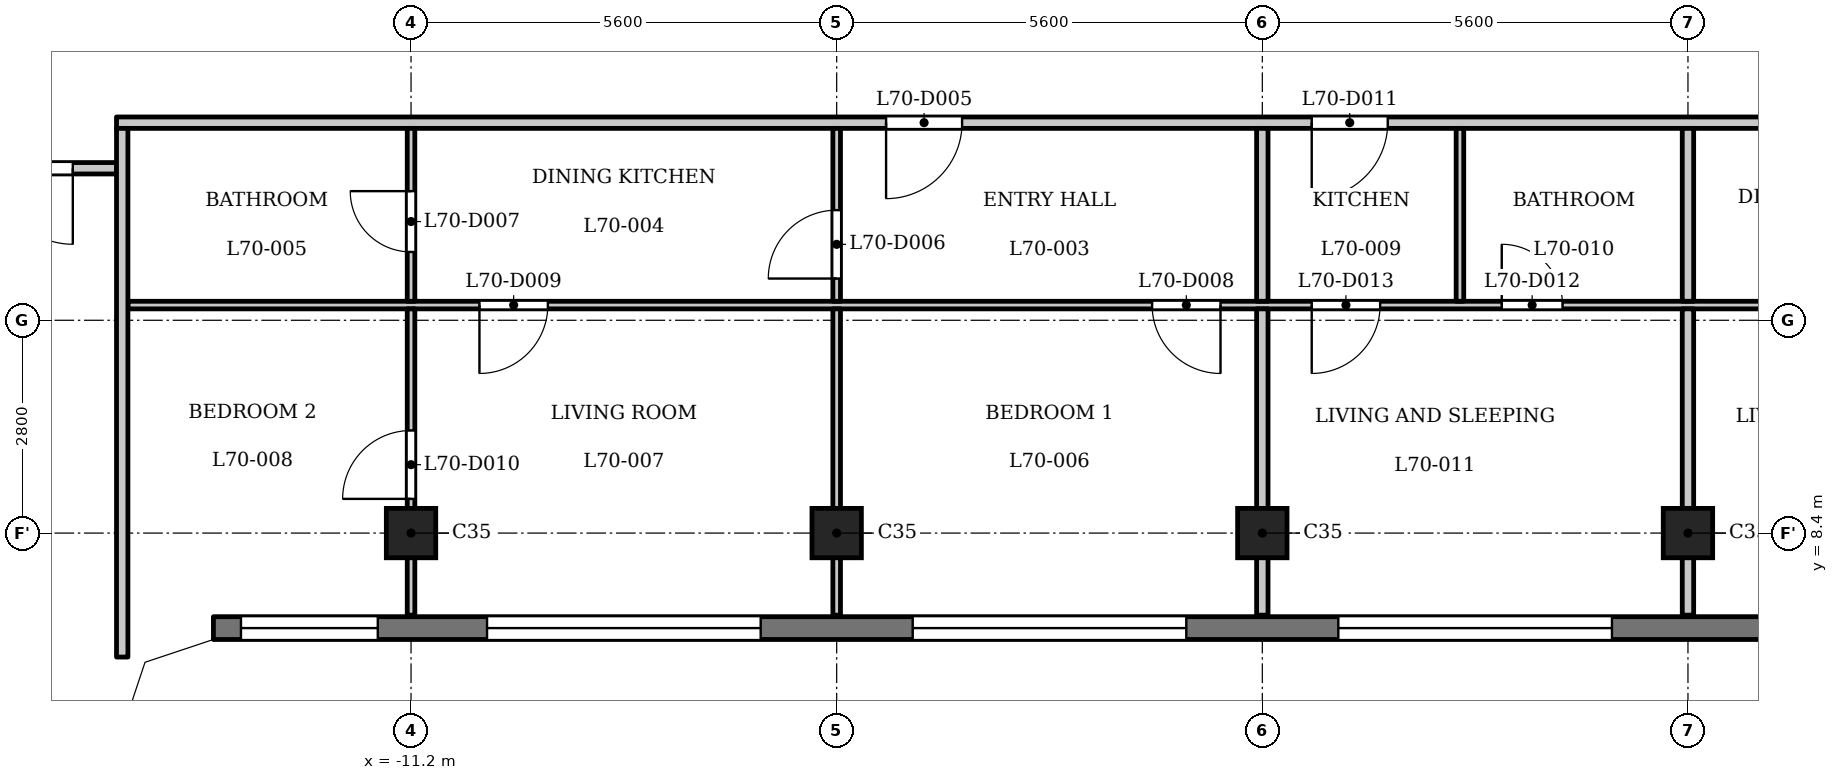
"""IFC4 building model, lengths in metres.
Left out: names, types, materials, properties, quantities, classifications, styles, units other than length and angle.
Written with IfcOpenShell. Run it as: python <this file> out.ifc"""

import sys

from ifc_helpers import new_model, si_unit, direction, frame, frame_2d, origin, origin_2d, place, context, subcontext, project, spatial, polyline, rectangle, outline, extrude, element, fill, save


model = new_model("IFC4")
c1 = context("Model", 3, precision=1e-05, world=origin(), true_north=direction((0.0, 1.0)))
c2 = subcontext(c1, "Body", "Model", "MODEL_VIEW")
j1 = project(units=[si_unit("LENGTHUNIT", "METRE"), si_unit("PLANEANGLEUNIT", "RADIAN")], contexts=[c1])
p1 = place(None, origin())
s1 = spatial("IfcSite", under=j1, at=p1, CompositionType="ELEMENT")
p2 = place(p1, origin())
s2 = spatial("IfcBuilding", under=s1, at=p2, CompositionType="ELEMENT")
p3 = place(p2, frame((0.0, 0.0, 269.7)))
s3 = spatial("IfcBuildingStorey", under=s2, at=p3, CompositionType="ELEMENT", Elevation=269.7)
for number, where, z_axis, x_axis in (
    (1, (-11.2, 8.4, 0.0), (0.0, 0.0, 1.0), (1.0, 0.0, 0.0)),
    (2, (-5.6, 8.4, 0.0), (0.0, 0.0, 1.0), (1.0, 0.0, 0.0)),
    (3, (0.0, 8.4, 0.0), (0.0, 0.0, 1.0), (1.0, 0.0, 0.0)),
    (4, (5.6, 8.4, 0.0), (0.0, 0.0, 1.0), (1.0, 0.0, 0.0)),
):
    element("IfcColumn", number, at=place(p3, frame(where, z_axis=z_axis, x_axis=x_axis)), inside=s3, PredefinedType="COLUMN", context=c2, shape_type="SweptSolid", body=[
        extrude(rectangle(XDim=0.65, YDim=0.65, at=origin_2d()), origin(), (0.0, 0.0, 1.0), 3.5),
    ])
p4 = place(p3, frame((-13.8, 7.15, 0.0), z_axis=(0.0, 0.0, 1.0), x_axis=(1.0, 0.0, 0.0)))
e5 = element("IfcWall", 5, at=p4, inside=s3, PredefinedType="SOLIDWALL", context=c2, shape_type="SweptSolid", body=[
    extrude(rectangle(XDim=27.6, YDim=0.3, at=frame_2d((13.8, 0.0))), origin(), (0.0, 0.0, 1.0), 3.2),
])
p5 = place(p4, frame((0.363, 0.0, 0.9)))
e6 = element("IfcOpeningElement", 6, at=p5, cuts=e5, PredefinedType="OPENING", context=c2, shape_type="SweptSolid", body=[
    extrude(rectangle(XDim=1.8, YDim=1.25, at=frame_2d((0.9, 0.625))), frame((0.0, 0.16, 0.0), z_axis=(0.0, -1.0, 0.0), x_axis=(1.0, 0.0, 0.0)), (0.0, 0.0, 1.0), 0.32),
])
p6 = place(p4, frame((3.6, 0.0, 1.2)))
e7 = element("IfcOpeningElement", 7, at=p6, cuts=e5, PredefinedType="OPENING", context=c2, shape_type="SweptSolid", body=[
    extrude(rectangle(XDim=3.6, YDim=0.95, at=frame_2d((1.8, 0.475))), frame((0.0, 0.16, 0.0), z_axis=(0.0, -1.0, 0.0), x_axis=(1.0, 0.0, 0.0)), (0.0, 0.0, 1.0), 0.32),
])
p7 = place(p4, frame((9.2, 0.0, 1.2)))
e8 = element("IfcOpeningElement", 8, at=p7, cuts=e5, PredefinedType="OPENING", context=c2, shape_type="SweptSolid", body=[
    extrude(rectangle(XDim=3.6, YDim=0.95, at=frame_2d((1.8, 0.475))), frame((0.0, 0.16, 0.0), z_axis=(0.0, -1.0, 0.0), x_axis=(1.0, 0.0, 0.0)), (0.0, 0.0, 1.0), 0.32),
])
p8 = place(p4, frame((14.8, 0.0, 1.2)))
e9 = element("IfcOpeningElement", 9, at=p8, cuts=e5, PredefinedType="OPENING", context=c2, shape_type="SweptSolid", body=[
    extrude(rectangle(XDim=3.6, YDim=0.95, at=frame_2d((1.8, 0.475))), frame((0.0, 0.16, 0.0), z_axis=(0.0, -1.0, 0.0), x_axis=(1.0, 0.0, 0.0)), (0.0, 0.0, 1.0), 0.32),
])
p9 = place(p4, frame((20.4, 0.0, 1.2)))
e10 = element("IfcOpeningElement", 10, at=p9, cuts=e5, PredefinedType="OPENING", context=c2, shape_type="SweptSolid", body=[
    extrude(rectangle(XDim=3.6, YDim=0.95, at=frame_2d((1.8, 0.475))), frame((0.0, 0.16, 0.0), z_axis=(0.0, -1.0, 0.0), x_axis=(1.0, 0.0, 0.0)), (0.0, 0.0, 1.0), 0.32),
])
p10 = place(p4, frame((25.438, 0.0, 0.9)))
e11 = element("IfcOpeningElement", 11, at=p10, cuts=e5, PredefinedType="OPENING", context=c2, shape_type="SweptSolid", body=[
    extrude(rectangle(XDim=1.8, YDim=1.25, at=frame_2d((0.9, 0.625))), frame((0.0, 0.16, 0.0), z_axis=(0.0, -1.0, 0.0), x_axis=(1.0, 0.0, 0.0)), (0.0, 0.0, 1.0), 0.32),
])
p11 = place(p3, frame((-14.925, 11.4, 0.0), z_axis=(0.0, 0.0, 1.0), x_axis=(1.0, 0.0, 0.0)))
e12 = element("IfcWall", 12, at=p11, inside=s3, PredefinedType="PARTITIONING", context=c2, shape_type="SweptSolid", body=[
    extrude(rectangle(XDim=29.85, YDim=0.1, at=frame_2d((14.925, 0.0))), origin(), (0.0, 0.0, 1.0), 3.2),
])
p12 = place(p11, frame((13.475, 0.0, 0.0)))
e13 = element("IfcOpeningElement", 13, at=p12, cuts=e12, PredefinedType="OPENING", context=c2, shape_type="SweptSolid", body=[
    extrude(rectangle(XDim=0.9, YDim=2.1, at=frame_2d((0.45, 1.05))), frame((0.0, 0.06, 0.0), z_axis=(0.0, -1.0, 0.0), x_axis=(1.0, 0.0, 0.0)), (0.0, 0.0, 1.0), 0.12),
])
p13 = place(p11, frame((4.625, 0.0, 0.0)))
e14 = element("IfcOpeningElement", 14, at=p13, cuts=e12, PredefinedType="OPENING", context=c2, shape_type="SweptSolid", body=[
    extrude(rectangle(XDim=0.9, YDim=2.1, at=frame_2d((0.45, 1.05))), frame((0.0, 0.06, 0.0), z_axis=(0.0, -1.0, 0.0), x_axis=(1.0, 0.0, 0.0)), (0.0, 0.0, 1.0), 0.12),
])
p14 = place(p11, frame((18.075, 0.0, 0.0)))
e15 = element("IfcOpeningElement", 15, at=p14, cuts=e12, PredefinedType="OPENING", context=c2, shape_type="SweptSolid", body=[
    extrude(rectangle(XDim=0.8, YDim=2.1, at=frame_2d((0.4, 1.05))), frame((0.0, 0.06, 0.0), z_axis=(0.0, -1.0, 0.0), x_axis=(1.0, 0.0, 0.0)), (0.0, 0.0, 1.0), 0.12),
])
p15 = place(p11, frame((15.575, 0.0, 0.0)))
e16 = element("IfcOpeningElement", 16, at=p15, cuts=e12, PredefinedType="OPENING", context=c2, shape_type="SweptSolid", body=[
    extrude(rectangle(XDim=0.9, YDim=2.1, at=frame_2d((0.45, 1.05))), frame((0.0, 0.06, 0.0), z_axis=(0.0, -1.0, 0.0), x_axis=(1.0, 0.0, 0.0)), (0.0, 0.0, 1.0), 0.12),
])
p16 = place(p11, frame((28.474, 0.0, 0.0)))
e17 = element("IfcOpeningElement", 17, at=p16, cuts=e12, PredefinedType="OPENING", context=c2, shape_type="SweptSolid", body=[
    extrude(rectangle(XDim=0.8, YDim=2.1, at=frame_2d((0.4, 1.05))), frame((0.0, 0.06, 0.0), z_axis=(0.0, -1.0, 0.0), x_axis=(1.0, 0.0, 0.0)), (0.0, 0.0, 1.0), 0.12),
])
p17 = place(p11, frame((23.425, 0.0, 0.0)))
e18 = element("IfcOpeningElement", 18, at=p17, cuts=e12, PredefinedType="OPENING", context=c2, shape_type="SweptSolid", body=[
    extrude(rectangle(XDim=0.9, YDim=2.1, at=frame_2d((0.45, 1.05))), frame((0.0, 0.06, 0.0), z_axis=(0.0, -1.0, 0.0), x_axis=(1.0, 0.0, 0.0)), (0.0, 0.0, 1.0), 0.12),
])
p18 = place(p3, frame((-17.4, 13.2, 0.0), z_axis=(0.0, 0.0, 1.0), x_axis=(1.0, 0.0, 0.0)))
e19 = element("IfcWall", 19, at=p18, inside=s3, PredefinedType="PARTITIONING", context=c2, shape_type="SweptSolid", body=[
    extrude(rectangle(XDim=2.325, YDim=0.15, at=frame_2d((1.163, 0.0))), origin(), (0.0, 0.0, 1.0), 3.2),
])
p19 = place(p18, frame((0.75, 0.0, 0.0)))
e20 = element("IfcOpeningElement", 20, at=p19, cuts=e19, PredefinedType="OPENING", context=c2, shape_type="SweptSolid", body=[
    extrude(rectangle(XDim=1.0, YDim=2.1, at=frame_2d((0.5, 1.05))), frame((0.0, 0.085, 0.0), z_axis=(0.0, -1.0, 0.0), x_axis=(1.0, 0.0, 0.0)), (0.0, 0.0, 1.0), 0.17),
])
p20 = place(p3, frame((-15.075, 13.8, 0.0), z_axis=(0.0, 0.0, 1.0), x_axis=(1.0, 0.0, 0.0)))
e21 = element("IfcWall", 21, at=p20, inside=s3, PredefinedType="PARTITIONING", context=c2, shape_type="SweptSolid", body=[
    extrude(rectangle(XDim=30.15, YDim=0.15, at=frame_2d((15.075, 0.0))), origin(), (0.0, 0.0, 1.0), 3.2),
])
p21 = place(p20, frame((10.125, 0.0, 0.0)))
e22 = element("IfcOpeningElement", 22, at=p21, cuts=e21, PredefinedType="OPENING", context=c2, shape_type="SweptSolid", body=[
    extrude(rectangle(XDim=1.0, YDim=2.1, at=frame_2d((0.5, 1.05))), frame((0.0, 0.085, 0.0), z_axis=(0.0, -1.0, 0.0), x_axis=(1.0, 0.0, 0.0)), (0.0, 0.0, 1.0), 0.17),
])
p22 = place(p20, frame((15.725, 0.0, 0.0)))
e23 = element("IfcOpeningElement", 23, at=p22, cuts=e21, PredefinedType="OPENING", context=c2, shape_type="SweptSolid", body=[
    extrude(rectangle(XDim=1.0, YDim=2.1, at=frame_2d((0.5, 1.05))), frame((0.0, 0.085, 0.0), z_axis=(0.0, -1.0, 0.0), x_axis=(1.0, 0.0, 0.0)), (0.0, 0.0, 1.0), 0.17),
])
p23 = place(p20, frame((24.575, 0.0, 0.0)))
e24 = element("IfcOpeningElement", 24, at=p23, cuts=e21, PredefinedType="OPENING", context=c2, shape_type="SweptSolid", body=[
    extrude(rectangle(XDim=1.0, YDim=2.1, at=frame_2d((0.5, 1.05))), frame((0.0, 0.085, 0.0), z_axis=(0.0, -1.0, 0.0), x_axis=(1.0, 0.0, 0.0)), (0.0, 0.0, 1.0), 0.17),
])
p24 = place(p3, frame((-15.0, 6.769, 0.0), z_axis=(0.0, 0.0, 1.0), x_axis=(0.0, 1.0, 0.0)))
e25 = element("IfcWall", 25, at=p24, inside=s3, PredefinedType="PARTITIONING", context=c2, shape_type="SweptSolid", body=[
    extrude(rectangle(XDim=6.956, YDim=0.15, at=frame_2d((3.478, 0.0))), origin(), (0.0, 0.0, 1.0), 3.2),
])
p25 = place(p3, frame((-11.2, 7.32, 0.0), z_axis=(0.0, 0.0, 1.0), x_axis=(0.0, 1.0, 0.0)))
e26 = element("IfcWall", 26, at=p25, inside=s3, PredefinedType="PARTITIONING", context=c2, shape_type="SweptSolid", body=[
    extrude(rectangle(XDim=4.03, YDim=0.1, at=frame_2d((2.015, 0.0))), origin(), (0.0, 0.0, 1.0), 3.2),
])
p26 = place(p25, frame((1.53, 0.0, 0.0)))
e27 = element("IfcOpeningElement", 27, at=p26, cuts=e26, PredefinedType="OPENING", context=c2, shape_type="SweptSolid", body=[
    extrude(rectangle(XDim=0.9, YDim=2.1, at=frame_2d((0.45, 1.05))), frame((0.0, 0.06, 0.0), z_axis=(0.0, -1.0, 0.0), x_axis=(1.0, 0.0, 0.0)), (0.0, 0.0, 1.0), 0.12),
])
p27 = place(p3, frame((-11.2, 11.45, 0.0), z_axis=(0.0, 0.0, 1.0), x_axis=(0.0, 1.0, 0.0)))
e28 = element("IfcWall", 28, at=p27, inside=s3, PredefinedType="PARTITIONING", context=c2, shape_type="SweptSolid", body=[
    extrude(rectangle(XDim=2.275, YDim=0.1, at=frame_2d((1.138, 0.0))), origin(), (0.0, 0.0, 1.0), 3.2),
])
p28 = place(p27, frame((0.649, 0.0, 0.0)))
e29 = element("IfcOpeningElement", 29, at=p28, cuts=e28, PredefinedType="OPENING", context=c2, shape_type="SweptSolid", body=[
    extrude(rectangle(XDim=0.8, YDim=2.1, at=frame_2d((0.4, 1.05))), frame((0.0, 0.06, 0.0), z_axis=(0.0, -1.0, 0.0), x_axis=(1.0, 0.0, 0.0)), (0.0, 0.0, 1.0), 0.12),
])
p29 = place(p3, frame((-5.6, 7.32, 0.0), z_axis=(0.0, 0.0, 1.0), x_axis=(0.0, 1.0, 0.0)))
e30 = element("IfcWall", 30, at=p29, inside=s3, PredefinedType="PARTITIONING", context=c2, shape_type="SweptSolid", body=[
    extrude(rectangle(XDim=4.03, YDim=0.1, at=frame_2d((2.015, 0.0))), origin(), (0.0, 0.0, 1.0), 3.2),
])
p30 = place(p3, frame((-5.6, 11.45, 0.0), z_axis=(0.0, 0.0, 1.0), x_axis=(0.0, 1.0, 0.0)))
e31 = element("IfcWall", 31, at=p30, inside=s3, PredefinedType="PARTITIONING", context=c2, shape_type="SweptSolid", body=[
    extrude(rectangle(XDim=2.275, YDim=0.1, at=frame_2d((1.138, 0.0))), origin(), (0.0, 0.0, 1.0), 3.2),
])
p31 = place(p30, frame((0.299, 0.0, 0.0)))
e32 = element("IfcOpeningElement", 32, at=p31, cuts=e31, PredefinedType="OPENING", context=c2, shape_type="SweptSolid", body=[
    extrude(rectangle(XDim=0.9, YDim=2.1, at=frame_2d((0.45, 1.05))), frame((0.0, 0.06, 0.0), z_axis=(0.0, -1.0, 0.0), x_axis=(1.0, 0.0, 0.0)), (0.0, 0.0, 1.0), 0.12),
])
p32 = place(p3, frame((0.0, 7.32, 0.0), z_axis=(0.0, 0.0, 1.0), x_axis=(0.0, 1.0, 0.0)))
e33 = element("IfcWall", 33, at=p32, inside=s3, PredefinedType="PARTITIONING", context=c2, shape_type="SweptSolid", body=[
    extrude(rectangle(XDim=4.03, YDim=0.15, at=frame_2d((2.015, 0.0))), origin(), (0.0, 0.0, 1.0), 3.2),
])
p33 = place(p3, frame((0.0, 11.45, 0.0), z_axis=(0.0, 0.0, 1.0), x_axis=(0.0, 1.0, 0.0)))
e34 = element("IfcWall", 34, at=p33, inside=s3, PredefinedType="PARTITIONING", context=c2, shape_type="SweptSolid", body=[
    extrude(rectangle(XDim=2.275, YDim=0.15, at=frame_2d((1.138, 0.0))), origin(), (0.0, 0.0, 1.0), 3.2),
])
p34 = place(p3, frame((2.6, 11.45, 0.0), z_axis=(0.0, 0.0, 1.0), x_axis=(0.0, 1.0, 0.0)))
e35 = element("IfcWall", 35, at=p34, inside=s3, PredefinedType="PARTITIONING", context=c2, shape_type="SweptSolid", body=[
    extrude(rectangle(XDim=2.275, YDim=0.1, at=frame_2d((1.138, 0.0))), origin(), (0.0, 0.0, 1.0), 3.2),
])
p35 = place(p3, frame((5.6, 7.32, 0.0), z_axis=(0.0, 0.0, 1.0), x_axis=(0.0, 1.0, 0.0)))
e36 = element("IfcWall", 36, at=p35, inside=s3, PredefinedType="PARTITIONING", context=c2, shape_type="SweptSolid", body=[
    extrude(rectangle(XDim=4.03, YDim=0.15, at=frame_2d((2.015, 0.0))), origin(), (0.0, 0.0, 1.0), 3.2),
])
p36 = place(p3, frame((5.6, 11.45, 0.0), z_axis=(0.0, 0.0, 1.0), x_axis=(0.0, 1.0, 0.0)))
e37 = element("IfcWall", 37, at=p36, inside=s3, PredefinedType="PARTITIONING", context=c2, shape_type="SweptSolid", body=[
    extrude(rectangle(XDim=2.275, YDim=0.15, at=frame_2d((1.138, 0.0))), origin(), (0.0, 0.0, 1.0), 3.2),
])
p37 = place(p3, origin())
e38 = element("IfcWall", 38, at=p37, inside=s3, PredefinedType="SOLIDWALL", context=c2, shape_type="SweptSolid", body=[
    extrude(outline(polyline([(-13.849, 7.3), (-14.937, 6.937), (-15.3, 5.849), (-15.3, 5.8), (-15.0, 5.8), (-14.7, 6.7), (-13.8, 7.0), (-13.8, 7.3), (-13.849, 7.3)])), origin(), (0.0, 0.0, 1.0), 3.2),
])
p38 = place(p19, origin())
e39 = element("IfcDoor", 39, at=p38, inside=s3, OperationType="SINGLE_SWING_RIGHT", PredefinedType="DOOR", context=c2, shape_type="SweptSolid", body=[
    extrude(rectangle(XDim=1.0, YDim=2.1, at=frame_2d((0.5, 1.05))), frame((0.0, 0.025, 0.0), z_axis=(0.0, -1.0, 0.0), x_axis=(1.0, 0.0, 0.0)), (0.0, 0.0, 1.0), 0.05),
])
fill(e20, e39)
p39 = place(p21, origin())
e40 = element("IfcDoor", 40, at=p39, inside=s3, OperationType="SINGLE_SWING_LEFT", PredefinedType="DOOR", context=c2, shape_type="SweptSolid", body=[
    extrude(rectangle(XDim=1.0, YDim=2.1, at=frame_2d((0.5, 1.05))), frame((0.0, 0.025, 0.0), z_axis=(0.0, -1.0, 0.0), x_axis=(1.0, 0.0, 0.0)), (0.0, 0.0, 1.0), 0.05),
])
fill(e22, e40)
p40 = place(p31, origin())
e41 = element("IfcDoor", 41, at=p40, inside=s3, OperationType="SINGLE_SWING_RIGHT", PredefinedType="DOOR", context=c2, shape_type="SweptSolid", body=[
    extrude(rectangle(XDim=0.9, YDim=2.1, at=frame_2d((0.45, 1.05))), frame((0.0, 0.025, 0.0), z_axis=(0.0, -1.0, 0.0), x_axis=(1.0, 0.0, 0.0)), (0.0, 0.0, 1.0), 0.05),
])
fill(e32, e41)
p41 = place(p28, origin())
e42 = element("IfcDoor", 42, at=p41, inside=s3, OperationType="SINGLE_SWING_LEFT", PredefinedType="DOOR", context=c2, shape_type="SweptSolid", body=[
    extrude(rectangle(XDim=0.8, YDim=2.1, at=frame_2d((0.4, 1.05))), frame((0.0, 0.025, 0.0), z_axis=(0.0, -1.0, 0.0), x_axis=(1.0, 0.0, 0.0)), (0.0, 0.0, 1.0), 0.05),
])
fill(e29, e42)
p42 = place(p12, origin())
e43 = element("IfcDoor", 43, at=p42, inside=s3, OperationType="SINGLE_SWING_RIGHT", PredefinedType="DOOR", context=c2, shape_type="SweptSolid", body=[
    extrude(rectangle(XDim=0.9, YDim=2.1, at=frame_2d((0.45, 1.05))), frame((0.0, 0.025, 0.0), z_axis=(0.0, -1.0, 0.0), x_axis=(1.0, 0.0, 0.0)), (0.0, 0.0, 1.0), 0.05),
])
fill(e13, e43)
p43 = place(p13, origin())
e44 = element("IfcDoor", 44, at=p43, inside=s3, OperationType="SINGLE_SWING_LEFT", PredefinedType="DOOR", context=c2, shape_type="SweptSolid", body=[
    extrude(rectangle(XDim=0.9, YDim=2.1, at=frame_2d((0.45, 1.05))), frame((0.0, 0.025, 0.0), z_axis=(0.0, -1.0, 0.0), x_axis=(1.0, 0.0, 0.0)), (0.0, 0.0, 1.0), 0.05),
])
fill(e14, e44)
p44 = place(p26, origin())
e45 = element("IfcDoor", 45, at=p44, inside=s3, OperationType="SINGLE_SWING_RIGHT", PredefinedType="DOOR", context=c2, shape_type="SweptSolid", body=[
    extrude(rectangle(XDim=0.9, YDim=2.1, at=frame_2d((0.45, 1.05))), frame((0.0, 0.025, 0.0), z_axis=(0.0, -1.0, 0.0), x_axis=(1.0, 0.0, 0.0)), (0.0, 0.0, 1.0), 0.05),
])
fill(e27, e45)
p45 = place(p22, origin())
e46 = element("IfcDoor", 46, at=p45, inside=s3, OperationType="SINGLE_SWING_LEFT", PredefinedType="DOOR", context=c2, shape_type="SweptSolid", body=[
    extrude(rectangle(XDim=1.0, YDim=2.1, at=frame_2d((0.5, 1.05))), frame((0.0, 0.025, 0.0), z_axis=(0.0, -1.0, 0.0), x_axis=(1.0, 0.0, 0.0)), (0.0, 0.0, 1.0), 0.05),
])
fill(e23, e46)
p46 = place(p14, origin())
e47 = element("IfcDoor", 47, at=p46, inside=s3, OperationType="SINGLE_SWING_RIGHT", PredefinedType="DOOR", context=c2, shape_type="SweptSolid", body=[
    extrude(rectangle(XDim=0.8, YDim=2.1, at=frame_2d((0.4, 1.05))), frame((0.0, 0.025, 0.0), z_axis=(0.0, -1.0, 0.0), x_axis=(1.0, 0.0, 0.0)), (0.0, 0.0, 1.0), 0.05),
])
fill(e15, e47)
p47 = place(p15, origin())
e48 = element("IfcDoor", 48, at=p47, inside=s3, OperationType="SINGLE_SWING_LEFT", PredefinedType="DOOR", context=c2, shape_type="SweptSolid", body=[
    extrude(rectangle(XDim=0.9, YDim=2.1, at=frame_2d((0.45, 1.05))), frame((0.0, 0.025, 0.0), z_axis=(0.0, -1.0, 0.0), x_axis=(1.0, 0.0, 0.0)), (0.0, 0.0, 1.0), 0.05),
])
fill(e16, e48)
p48 = place(p5, origin())
e49 = element("IfcWindow", 49, at=p48, inside=s3, PartitioningType="SINGLE_PANEL", PredefinedType="WINDOW", context=c2, shape_type="SweptSolid", body=[
    extrude(rectangle(XDim=1.8, YDim=1.25, at=frame_2d((0.9, 0.625))), frame((0.0, 0.03, 0.0), z_axis=(0.0, -1.0, 0.0), x_axis=(1.0, 0.0, 0.0)), (0.0, 0.0, 1.0), 0.06),
])
fill(e6, e49)
p49 = place(p6, origin())
e50 = element("IfcWindow", 50, at=p49, inside=s3, PartitioningType="SINGLE_PANEL", PredefinedType="WINDOW", context=c2, shape_type="SweptSolid", body=[
    extrude(rectangle(XDim=3.6, YDim=0.95, at=frame_2d((1.8, 0.475))), frame((0.0, 0.03, 0.0), z_axis=(0.0, -1.0, 0.0), x_axis=(1.0, 0.0, 0.0)), (0.0, 0.0, 1.0), 0.06),
])
fill(e7, e50)
p50 = place(p7, origin())
e51 = element("IfcWindow", 51, at=p50, inside=s3, PartitioningType="SINGLE_PANEL", PredefinedType="WINDOW", context=c2, shape_type="SweptSolid", body=[
    extrude(rectangle(XDim=3.6, YDim=0.95, at=frame_2d((1.8, 0.475))), frame((0.0, 0.03, 0.0), z_axis=(0.0, -1.0, 0.0), x_axis=(1.0, 0.0, 0.0)), (0.0, 0.0, 1.0), 0.06),
])
fill(e8, e51)
p51 = place(p8, origin())
e52 = element("IfcWindow", 52, at=p51, inside=s3, PartitioningType="SINGLE_PANEL", PredefinedType="WINDOW", context=c2, shape_type="SweptSolid", body=[
    extrude(rectangle(XDim=3.6, YDim=0.95, at=frame_2d((1.8, 0.475))), frame((0.0, 0.03, 0.0), z_axis=(0.0, -1.0, 0.0), x_axis=(1.0, 0.0, 0.0)), (0.0, 0.0, 1.0), 0.06),
])
fill(e9, e52)
save(model, sys.argv[1])
